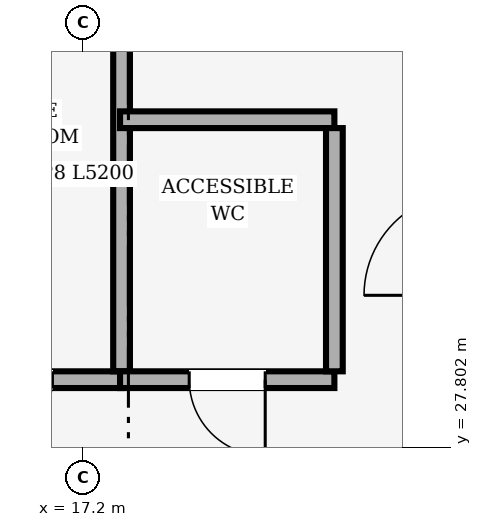
"""IFC4 building model, lengths in metres.
Left out: names, types, materials, properties, quantities, classifications, styles, units other than length and angle.
Written with IfcOpenShell. Run it as: python <this file> out.ifc"""

import sys

from ifc_helpers import new_model, si_unit, direction, frame, frame_2d, origin, place, context, subcontext, project, spatial, rectangle, extrude, element, fill, save


model = new_model("IFC4")
c1 = context("Model", 3, precision=1e-05, world=origin(), true_north=direction((0.0, 1.0)))
c2 = subcontext(c1, "Body", "Model", "MODEL_VIEW")
j1 = project(units=[si_unit("LENGTHUNIT", "METRE"), si_unit("PLANEANGLEUNIT", "RADIAN")], contexts=[c1])
p1 = place(None, origin())
s1 = spatial("IfcSite", under=j1, at=p1, CompositionType="ELEMENT")
p2 = place(p1, origin())
s2 = spatial("IfcBuilding", under=s1, at=p2, CompositionType="ELEMENT")
p3 = place(p2, frame((0.0, 0.0, 8.4)))
s3 = spatial("IfcBuildingStorey", under=s2, at=p3, CompositionType="ELEMENT", Elevation=8.4)
p4 = place(p3, frame((17.71, 28.69, 0.0), z_axis=(0.0, 0.0, 1.0), x_axis=(-1.0, 0.0, 0.0)))
e1 = element("IfcWall", 1, at=p4, inside=s3, PredefinedType="PLUMBINGWALL", context=c2, shape_type="SweptSolid", body=[
    extrude(rectangle(XDim=2.82, YDim=0.22, at=frame_2d((1.41, 0.0))), origin(), (0.0, 0.0, 1.0), 3.32),
])
p5 = place(p4, frame((0.91, 0.0, 0.0)))
e2 = element("IfcOpeningElement", 2, at=p5, cuts=e1, PredefinedType="OPENING", context=c2, shape_type="SweptSolid", body=[
    extrude(rectangle(XDim=1.0, YDim=2.1, at=frame_2d((0.5, 1.05))), frame((0.0, 0.11, 0.0), z_axis=(0.0, -1.0, 0.0), x_axis=(1.0, 0.0, 0.0)), (0.0, 0.0, 1.0), 0.22),
])
p6 = place(p3, frame((17.71, 34.0, 0.0), z_axis=(0.0, 0.0, 1.0), x_axis=(0.0, -1.0, 0.0)))
e3 = element("IfcWall", 3, at=p6, inside=s3, PredefinedType="PLUMBINGWALL", context=c2, shape_type="SweptSolid", body=[
    extrude(rectangle(XDim=5.2, YDim=0.22, at=frame_2d((2.6, 0.0))), origin(), (0.0, 0.0, 1.0), 3.32),
])
p7 = place(p3, frame((20.51, 28.69, 0.0), z_axis=(0.0, 0.0, 1.0), x_axis=(-1.0, 0.0, 0.0)))
e4 = element("IfcWall", 4, at=p7, inside=s3, PredefinedType="PLUMBINGWALL", context=c2, shape_type="SweptSolid", body=[
    extrude(rectangle(XDim=2.82, YDim=0.22, at=frame_2d((1.41, 0.0))), origin(), (0.0, 0.0, 1.0), 3.32),
])
p8 = place(p7, frame((0.91, 0.0, 0.0)))
e5 = element("IfcOpeningElement", 5, at=p8, cuts=e4, PredefinedType="OPENING", context=c2, shape_type="SweptSolid", body=[
    extrude(rectangle(XDim=1.0, YDim=2.1, at=frame_2d((0.5, 1.05))), frame((0.0, 0.11, 0.0), z_axis=(0.0, -1.0, 0.0), x_axis=(1.0, 0.0, 0.0)), (0.0, 0.0, 1.0), 0.22),
])
p9 = place(p3, frame((17.69, 32.11, 0.0), z_axis=(0.0, 0.0, 1.0), x_axis=(1.0, 0.0, 0.0)))
e6 = element("IfcWall", 6, at=p9, inside=s3, PredefinedType="PLUMBINGWALL", context=c2, shape_type="SweptSolid", body=[
    extrude(rectangle(XDim=2.82, YDim=0.22, at=frame_2d((1.41, 0.0))), origin(), (0.0, 0.0, 1.0), 3.32),
])
p10 = place(p3, frame((20.51, 32.0, 0.0), z_axis=(0.0, 0.0, 1.0), x_axis=(0.0, -1.0, 0.0)))
e7 = element("IfcWall", 7, at=p10, inside=s3, PredefinedType="PLUMBINGWALL", context=c2, shape_type="SweptSolid", body=[
    extrude(rectangle(XDim=3.2, YDim=0.22, at=frame_2d((1.6, 0.0))), origin(), (0.0, 0.0, 1.0), 3.32),
])
p11 = place(p8, origin())
e8 = element("IfcDoor", 8, at=p11, inside=s3, OperationType="SINGLE_SWING_LEFT", PredefinedType="DOOR", context=c2, shape_type="SweptSolid", body=[
    extrude(rectangle(XDim=1.0, YDim=2.1, at=frame_2d((0.5, 1.05))), frame((0.0, 0.025, 0.0), z_axis=(0.0, -1.0, 0.0), x_axis=(1.0, 0.0, 0.0)), (0.0, 0.0, 1.0), 0.05),
])
fill(e5, e8)
save(model, sys.argv[1])
